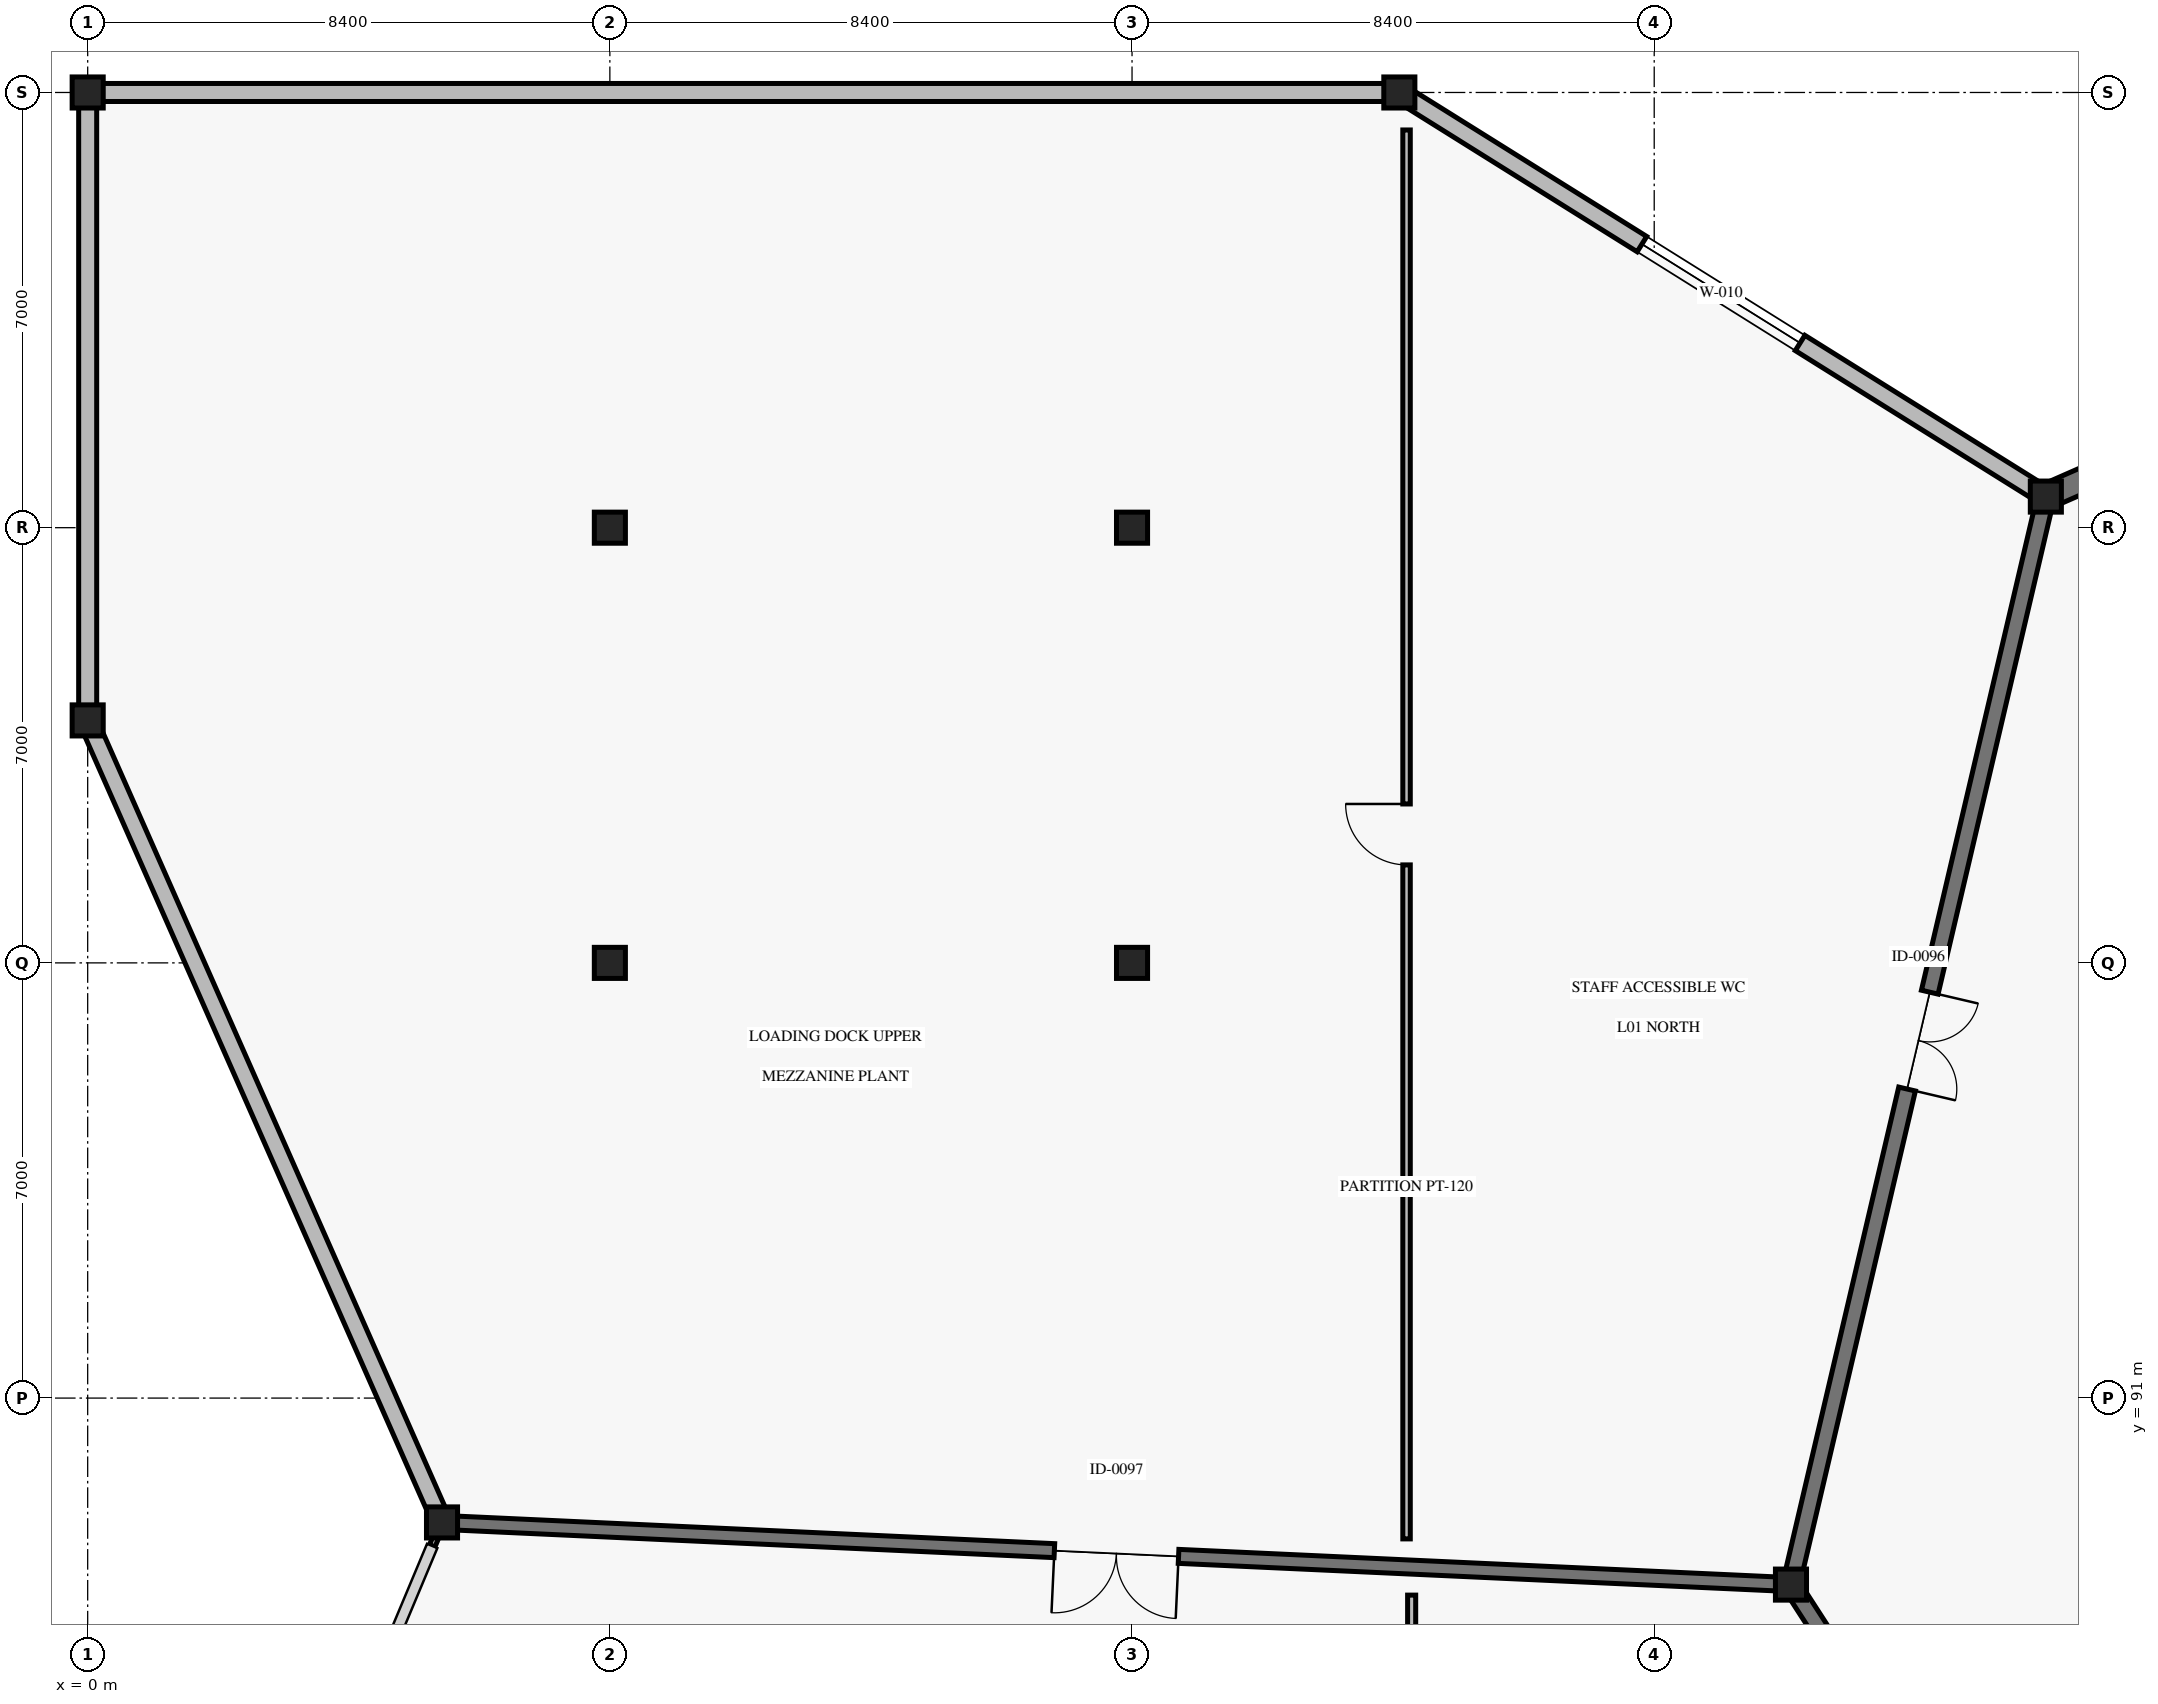
"""IFC4 building model, lengths in metres.
Left out: names, types, materials, properties, quantities, classifications, styles, units other than length and angle.
Written with IfcOpenShell. Run it as: python <this file> out.ifc"""

import sys

from ifc_helpers import new_model, si_unit, direction, frame, frame_2d, origin, origin_2d, place, context, subcontext, project, spatial, rectangle, extrude, element, fill, save


model = new_model("IFC4")
c1 = context("Model", 3, precision=1e-05, world=origin(), true_north=direction((0.0, 1.0)))
c2 = subcontext(c1, "Body", "Model", "MODEL_VIEW")
j1 = project(units=[si_unit("LENGTHUNIT", "METRE"), si_unit("PLANEANGLEUNIT", "RADIAN")], contexts=[c1])
p1 = place(None, origin())
s1 = spatial("IfcSite", under=j1, at=p1, CompositionType="ELEMENT")
p2 = place(p1, origin())
s2 = spatial("IfcBuilding", under=s1, at=p2, CompositionType="ELEMENT")
p3 = place(p2, frame((0.0, 0.0, 5.4)))
s3 = spatial("IfcBuildingStorey", under=s2, at=p3, CompositionType="ELEMENT", Elevation=5.4)
for number, where, z_axis, x_axis in (
    (1, (0.0, 101.9, 0.0), (0.0, 0.0, 1.0), (1.0, 0.0, 0.0)),
    (2, (0.0, 112.0, 0.0), (0.0, 0.0, 1.0), (1.0, 0.0, 0.0)),
    (3, (5.7, 89.0, 0.0), (0.0, 0.0, 1.0), (1.0, 0.0, 0.0)),
    (4, (21.1, 112.0, 0.0), (0.0, 0.0, 1.0), (1.0, 0.0, 0.0)),
    (5, (27.4, 88.0, 0.0), (0.0, 0.0, 1.0), (1.0, 0.0, 0.0)),
    (6, (31.5, 105.5, 0.0), (0.0, 0.0, 1.0), (1.0, 0.0, 0.0)),
    (7, (8.4, 98.0, 0.0), (0.0, 0.0, 1.0), (1.0, 0.0, 0.0)),
    (8, (8.4, 105.0, 0.0), (0.0, 0.0, 1.0), (1.0, 0.0, 0.0)),
    (9, (16.8, 98.0, 0.0), (0.0, 0.0, 1.0), (1.0, 0.0, 0.0)),
    (10, (16.8, 105.0, 0.0), (0.0, 0.0, 1.0), (1.0, 0.0, 0.0)),
):
    element("IfcColumn", number, at=place(p3, frame(where, z_axis=z_axis, x_axis=x_axis)), inside=s3, PredefinedType="COLUMN", context=c2, shape_type="SweptSolid", body=[
        extrude(rectangle(XDim=0.5, YDim=0.5, at=origin_2d()), origin(), (0.0, 0.0, 1.0), 4.8),
    ])
p4 = place(p3, frame((31.555, 105.524, 0.0), z_axis=(0.0, 0.0, 1.0), x_axis=(0.915561631163, 0.402177696474, 0.0)))
e11 = element("IfcWall", 11, at=p4, inside=s3, PredefinedType="SOLIDWALL", context=c2, shape_type="SweptSolid", body=[
    extrude(rectangle(XDim=11.627, YDim=0.4, at=frame_2d((5.813, 0.0))), origin(), (0.0, 0.0, 1.0), 3.62),
])
p5 = place(p3, frame((5.542, 88.622, 0.0), z_axis=(0.0, 0.0, 1.0), x_axis=(0.3862479465, 0.922394993387, 0.0)))
e12 = element("IfcWall", 12, at=p5, inside=s3, PredefinedType="SOLIDWALL", context=c2, shape_type="SweptSolid", body=[
    extrude(rectangle(XDim=0.308, YDim=0.095, at=frame_2d((0.154, 0.0))), origin(), (0.0, 0.0, 1.0), 3.62),
])
p6 = place(p3, frame((21.1, 112.0, 0.0), z_axis=(0.0, 0.0, 1.0), x_axis=(0.84799942789, -0.529997141784, 0.0)))
e13 = element("IfcWall", 13, at=p6, inside=s3, PredefinedType="SOLIDWALL", context=c2, shape_type="SweptSolid", body=[
    extrude(rectangle(XDim=12.204, YDim=0.29, at=frame_2d((6.102, 0.0))), origin(), (0.0, 0.0, 1.0), 3.62),
])
p7 = place(p6, frame((4.602, 0.0, 0.95)))
e14 = element("IfcOpeningElement", 14, at=p7, cuts=e13, PredefinedType="OPENING", context=c2, shape_type="SweptSolid", body=[
    extrude(rectangle(XDim=3.0, YDim=2.1, at=frame_2d((1.5, 1.05))), frame((0.0, 0.155, 0.0), z_axis=(0.0, -1.0, 0.0), x_axis=(1.0, 0.0, 0.0)), (0.0, 0.0, 1.0), 0.31),
])
p8 = place(p3, frame((0.0, 112.0, 0.0), z_axis=(0.0, 0.0, 1.0), x_axis=(1.0, 0.0, 0.0)))
e15 = element("IfcWall", 15, at=p8, inside=s3, PredefinedType="SOLIDWALL", context=c2, shape_type="SweptSolid", body=[
    extrude(rectangle(XDim=21.1, YDim=0.29, at=frame_2d((10.55, 0.0))), origin(), (0.0, 0.0, 1.0), 3.62),
])
p9 = place(p3, frame((0.0, 101.9, 0.0), z_axis=(0.0, 0.0, 1.0), x_axis=(0.0, 1.0, 0.0)))
e16 = element("IfcWall", 16, at=p9, inside=s3, PredefinedType="SOLIDWALL", context=c2, shape_type="SweptSolid", body=[
    extrude(rectangle(XDim=10.1, YDim=0.29, at=frame_2d((5.05, 0.0))), origin(), (0.0, 0.0, 1.0), 3.62),
])
p10 = place(p3, frame((5.676, 89.055, 0.0), z_axis=(0.0, 0.0, 1.0), x_axis=(-0.404184143846, 0.914677636035, 0.0)))
e17 = element("IfcWall", 17, at=p10, inside=s3, PredefinedType="SOLIDWALL", context=c2, shape_type="SweptSolid", body=[
    extrude(rectangle(XDim=14.043, YDim=0.29, at=frame_2d((7.021, 0.0))), origin(), (0.0, 0.0, 1.0), 3.62),
])
p11 = place(p3, frame((27.4, 88.0, 0.0), z_axis=(0.0, 0.0, 1.0), x_axis=(0.542733189748, -0.839905164138, 0.0)))
e18 = element("IfcWall", 18, at=p11, inside=s3, PredefinedType="SOLIDWALL", context=c2, shape_type="SweptSolid", body=[
    extrude(rectangle(XDim=7.739, YDim=0.275, at=frame_2d((3.87, 0.0))), origin(), (0.0, 0.0, 1.0), 4.02),
])
p12 = place(p11, frame((3.069, 0.0, 0.0)))
e19 = element("IfcOpeningElement", 19, at=p12, cuts=e18, PredefinedType="OPENING", context=c2, shape_type="SweptSolid", body=[
    extrude(rectangle(XDim=1.6, YDim=2.45, at=frame_2d((0.8, 1.225))), frame((0.0, 0.147, 0.0), z_axis=(0.0, -1.0, 0.0), x_axis=(1.0, 0.0, 0.0)), (0.0, 0.0, 1.0), 0.295),
])
p13 = place(p3, frame((31.5, 105.5, 0.0), z_axis=(0.0, 0.0, 1.0), x_axis=(-0.228114067381, -0.973634414071, 0.0)))
e20 = element("IfcWall", 20, at=p13, inside=s3, PredefinedType="SOLIDWALL", context=c2, shape_type="SweptSolid", body=[
    extrude(rectangle(XDim=17.974, YDim=0.275, at=frame_2d((8.987, 0.0))), origin(), (0.0, 0.0, 1.0), 4.02),
])
p14 = place(p13, frame((8.187, 0.0, 0.0)))
e21 = element("IfcOpeningElement", 21, at=p14, cuts=e20, PredefinedType="OPENING", context=c2, shape_type="SweptSolid", body=[
    extrude(rectangle(XDim=1.6, YDim=2.45, at=frame_2d((0.8, 1.225))), frame((0.0, 0.147, 0.0), z_axis=(0.0, -1.0, 0.0), x_axis=(1.0, 0.0, 0.0)), (0.0, 0.0, 1.0), 0.295),
])
p15 = place(p3, frame((27.4, 88.0, 0.0), z_axis=(0.0, 0.0, 1.0), x_axis=(-0.998939864331, 0.046034198714, 0.0)))
e22 = element("IfcWall", 22, at=p15, inside=s3, PredefinedType="SOLIDWALL", context=c2, shape_type="SweptSolid", body=[
    extrude(rectangle(XDim=21.723, YDim=0.225, at=frame_2d((10.861, 0.0))), origin(), (0.0, 0.0, 1.0), 4.02),
])
p16 = place(p15, frame((9.862, 0.0, 0.0)))
e23 = element("IfcOpeningElement", 23, at=p16, cuts=e22, PredefinedType="OPENING", context=c2, shape_type="SweptSolid", body=[
    extrude(rectangle(XDim=2.0, YDim=2.5, at=frame_2d((1.0, 1.25))), frame((0.0, 0.123, 0.0), z_axis=(0.0, -1.0, 0.0), x_axis=(1.0, 0.0, 0.0)), (0.0, 0.0, 1.0), 0.245),
])
p17 = place(p3, frame((21.298, 65.439, 0.0), z_axis=(0.0, 0.0, 1.0), x_axis=(0.0, 1.0, 0.0)))
e24 = element("IfcWall", 24, at=p17, inside=s3, PredefinedType="PARTITIONING", context=c2, shape_type="SweptSolid", body=[
    extrude(rectangle(XDim=22.392, YDim=0.13, at=frame_2d((11.196, 0.0))), origin(), (0.0, 0.0, 1.0), 3.32),
])
p18 = place(p17, frame((10.646, 0.0, 0.0)))
e25 = element("IfcOpeningElement", 25, at=p18, cuts=e24, PredefinedType="OPENING", context=c2, shape_type="SweptSolid", body=[
    extrude(rectangle(XDim=1.1, YDim=2.2, at=frame_2d((0.55, 1.1))), frame((0.0, 0.075, 0.0), z_axis=(0.0, -1.0, 0.0), x_axis=(1.0, 0.0, 0.0)), (0.0, 0.0, 1.0), 0.15),
])
p19 = place(p3, frame((21.216, 88.735, 0.0), z_axis=(0.0, 0.0, 1.0), x_axis=(0.0, 1.0, 0.0)))
e26 = element("IfcWall", 26, at=p19, inside=s3, PredefinedType="PARTITIONING", context=c2, shape_type="SweptSolid", body=[
    extrude(rectangle(XDim=22.662, YDim=0.12, at=frame_2d((11.331, 0.0))), origin(), (0.0, 0.0, 1.0), 3.32),
])
p20 = place(p19, frame((10.841, 0.0, 0.0)))
e27 = element("IfcOpeningElement", 27, at=p20, cuts=e26, PredefinedType="OPENING", context=c2, shape_type="SweptSolid", body=[
    extrude(rectangle(XDim=0.98, YDim=2.15, at=frame_2d((0.49, 1.075))), frame((0.0, 0.07, 0.0), z_axis=(0.0, -1.0, 0.0), x_axis=(1.0, 0.0, 0.0)), (0.0, 0.0, 1.0), 0.14),
])
p21 = place(p7, origin())
e28 = element("IfcWindow", 28, at=p21, inside=s3, PartitioningType="SINGLE_PANEL", PredefinedType="WINDOW", context=c2, shape_type="SweptSolid", body=[
    extrude(rectangle(XDim=3.0, YDim=2.1, at=frame_2d((1.5, 1.05))), frame((0.0, 0.03, 0.0), z_axis=(0.0, -1.0, 0.0), x_axis=(1.0, 0.0, 0.0)), (0.0, 0.0, 1.0), 0.06),
])
fill(e14, e28)
p22 = place(p14, origin())
e29 = element("IfcDoor", 29, at=p22, inside=s3, OperationType="DOUBLE_DOOR_SINGLE_SWING", PredefinedType="DOOR", context=c2, shape_type="SweptSolid", body=[
    extrude(rectangle(XDim=1.6, YDim=2.45, at=frame_2d((0.8, 1.225))), frame((0.0, 0.025, 0.0), z_axis=(0.0, -1.0, 0.0), x_axis=(1.0, 0.0, 0.0)), (0.0, 0.0, 1.0), 0.05),
])
fill(e21, e29)
p23 = place(p16, origin())
e30 = element("IfcDoor", 30, at=p23, inside=s3, OperationType="DOUBLE_DOOR_SINGLE_SWING", PredefinedType="DOOR", context=c2, shape_type="SweptSolid", body=[
    extrude(rectangle(XDim=2.0, YDim=2.5, at=frame_2d((1.0, 1.25))), frame((0.0, 0.025, 0.0), z_axis=(0.0, -1.0, 0.0), x_axis=(1.0, 0.0, 0.0)), (0.0, 0.0, 1.0), 0.05),
])
fill(e23, e30)
p24 = place(p20, origin())
e31 = element("IfcDoor", 31, at=p24, inside=s3, OperationType="SINGLE_SWING_RIGHT", PredefinedType="DOOR", context=c2, shape_type="SweptSolid", body=[
    extrude(rectangle(XDim=0.98, YDim=2.15, at=frame_2d((0.49, 1.075))), frame((0.0, 0.025, 0.0), z_axis=(0.0, -1.0, 0.0), x_axis=(1.0, 0.0, 0.0)), (0.0, 0.0, 1.0), 0.05),
])
fill(e27, e31)
save(model, sys.argv[1])
